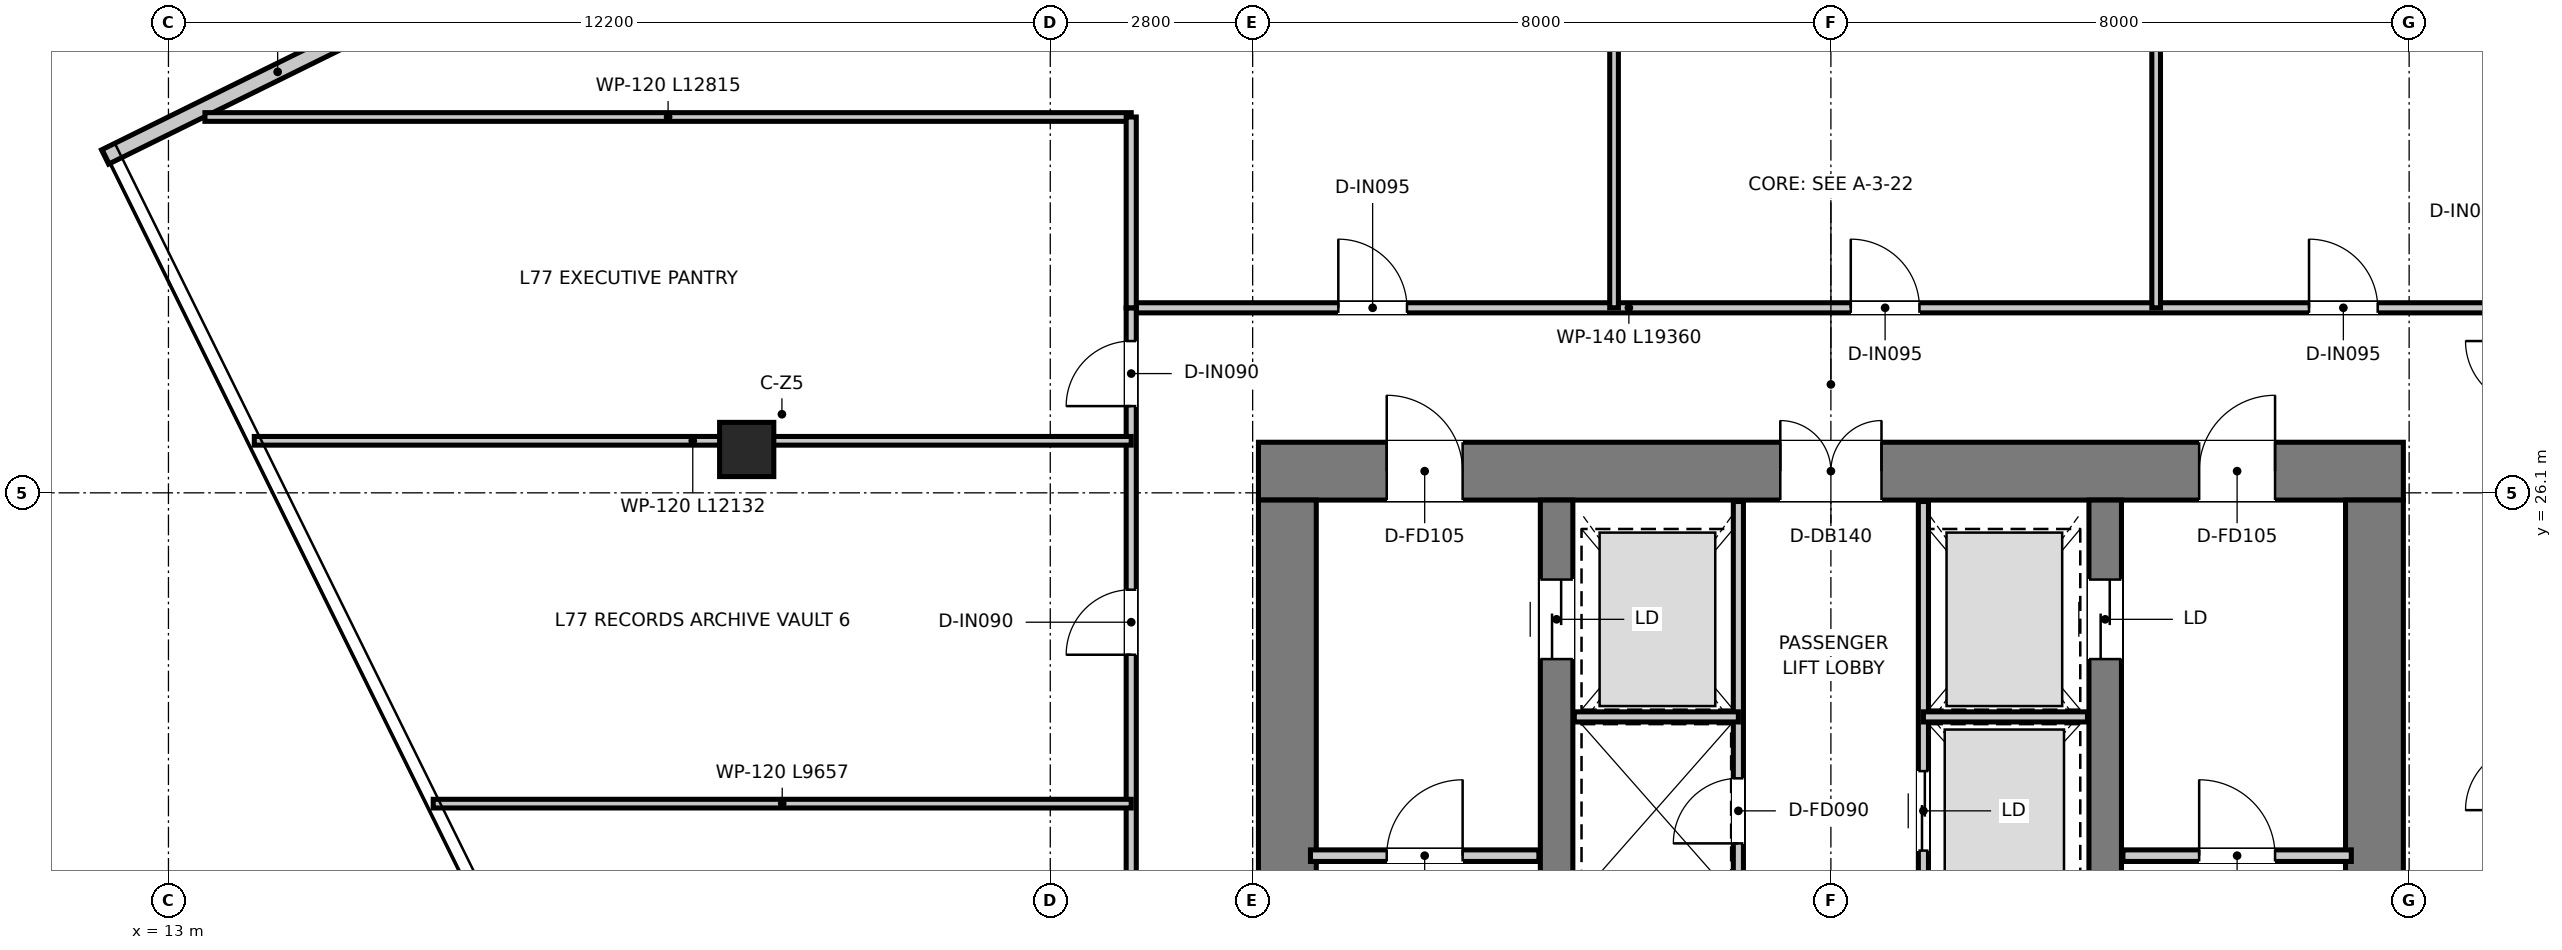
"""IFC4 building model, lengths in metres.
Left out: names, types, materials, properties, quantities, classifications, styles, units other than length and angle.
Written with IfcOpenShell. Run it as: python <this file> out.ifc"""

import sys

from ifc_helpers import new_model, si_unit, direction, frame, frame_2d, origin, origin_2d, place, context, subcontext, project, spatial, rectangle, extrude, source, transform, mapped, element, fill, save


model = new_model("IFC4")
c1 = context("Model", 3, precision=1e-05, world=origin(), true_north=direction((0.0, 1.0)))
c2 = subcontext(c1, "Body", "Model", "MODEL_VIEW")
j1 = project(units=[si_unit("LENGTHUNIT", "METRE"), si_unit("PLANEANGLEUNIT", "RADIAN")], contexts=[c1])
p1 = place(None, origin())
s1 = spatial("IfcSite", under=j1, at=p1, CompositionType="ELEMENT")
p2 = place(p1, origin())
s2 = spatial("IfcBuilding", under=s1, at=p2, CompositionType="ELEMENT")
p3 = place(p2, frame((0.0, 0.0, 314.8)))
s3 = spatial("IfcBuildingStorey", under=s2, at=p3, CompositionType="ELEMENT", Elevation=314.8)
p4 = place(p3, frame((28.08, 26.4, 0.0), z_axis=(0.0, 0.0, 1.0), x_axis=(1.0, 0.0, 0.0)))
e1 = element("IfcWall", 1, at=p4, inside=s3, PredefinedType="SHEAR", context=c2, shape_type="SweptSolid", body=[
    extrude(rectangle(XDim=15.84, YDim=0.8, at=frame_2d((7.92, 0.0))), origin(), (0.0, 0.0, 1.0), 3.95),
])
p5 = place(p4, frame((7.22, 0.0, 0.0)))
e2 = element("IfcOpeningElement", 2, at=p5, cuts=e1, PredefinedType="OPENING", context=c2, shape_type="SweptSolid", body=[
    extrude(rectangle(XDim=1.4, YDim=2.2, at=frame_2d((0.7, 1.1))), frame((0.0, 0.41, 0.0), z_axis=(0.0, -1.0, 0.0), x_axis=(1.0, 0.0, 0.0)), (0.0, 0.0, 1.0), 0.82),
])
p6 = place(p4, frame((1.775, 0.0, 0.0)))
e3 = element("IfcOpeningElement", 3, at=p6, cuts=e1, PredefinedType="OPENING", context=c2, shape_type="SweptSolid", body=[
    extrude(rectangle(XDim=1.05, YDim=2.1, at=frame_2d((0.525, 1.05))), frame((0.0, 0.41, 0.0), z_axis=(0.0, -1.0, 0.0), x_axis=(1.0, 0.0, 0.0)), (0.0, 0.0, 1.0), 0.82),
])
p7 = place(p4, frame((13.015, 0.0, 0.0)))
e4 = element("IfcOpeningElement", 4, at=p7, cuts=e1, PredefinedType="OPENING", context=c2, shape_type="SweptSolid", body=[
    extrude(rectangle(XDim=1.05, YDim=2.1, at=frame_2d((0.525, 1.05))), frame((0.0, 0.41, 0.0), z_axis=(0.0, -1.0, 0.0), x_axis=(1.0, 0.0, 0.0)), (0.0, 0.0, 1.0), 0.82),
])
for number, where, z_axis, x_axis in (
    (5, (28.48, 11.3, 0.0), (0.0, 0.0, 1.0), (0.0, 1.0, 0.0)),
    (6, (43.52, 11.3, 0.0), (0.0, 0.0, 1.0), (0.0, 1.0, 0.0)),
):
    element("IfcWall", number, at=place(p3, frame(where, z_axis=z_axis, x_axis=x_axis)), inside=s3, PredefinedType="SHEAR", context=c2, shape_type="SweptSolid", body=[
        extrude(rectangle(XDim=14.7, YDim=0.8, at=frame_2d((7.35, 0.0))), origin(), (0.0, 0.0, 1.0), 3.95),
    ])
p8 = place(p3, frame((32.205, 13.22, 0.0), z_axis=(0.0, 0.0, 1.0), x_axis=(0.0, 1.0, 0.0)))
e7 = element("IfcWall", 7, at=p8, inside=s3, PredefinedType="SHEAR", context=c2, shape_type="SweptSolid", body=[
    extrude(rectangle(XDim=12.78, YDim=0.45, at=frame_2d((6.39, 0.0))), origin(), (0.0, 0.0, 1.0), 3.95),
])
p9 = place(p8, frame((10.58, 0.0, 0.0)))
e8 = element("IfcOpeningElement", 8, at=p9, cuts=e7, PredefinedType="OPENING", context=c2, shape_type="SweptSolid", body=[
    extrude(rectangle(XDim=1.1, YDim=2.15, at=frame_2d((0.55, 1.075))), frame((0.0, 0.235, 0.0), z_axis=(0.0, -1.0, 0.0), x_axis=(1.0, 0.0, 0.0)), (0.0, 0.0, 1.0), 0.47),
])
p10 = place(p3, frame((39.795, 13.22, 0.0), z_axis=(0.0, 0.0, 1.0), x_axis=(0.0, 1.0, 0.0)))
e9 = element("IfcWall", 9, at=p10, inside=s3, PredefinedType="SHEAR", context=c2, shape_type="SweptSolid", body=[
    extrude(rectangle(XDim=12.78, YDim=0.45, at=frame_2d((6.39, 0.0))), origin(), (0.0, 0.0, 1.0), 3.95),
])
p11 = place(p10, frame((10.58, 0.0, 0.0)))
e10 = element("IfcOpeningElement", 10, at=p11, cuts=e9, PredefinedType="OPENING", context=c2, shape_type="SweptSolid", body=[
    extrude(rectangle(XDim=1.1, YDim=2.15, at=frame_2d((0.55, 1.075))), frame((0.0, 0.235, 0.0), z_axis=(0.0, -1.0, 0.0), x_axis=(1.0, 0.0, 0.0)), (0.0, 0.0, 1.0), 0.47),
])
m1 = source(origin(), c2, "Body", "SweptSolid", [
    extrude(rectangle(XDim=0.75, YDim=0.75, at=origin_2d()), origin(), (0.0, 0.0, 1.0), 3.95),
])
p12 = place(p3, frame((21.0, 26.7, 0.0), z_axis=(0.0, 0.0, 1.0), x_axis=(1.0, 0.0, 0.0)))
e11 = element("IfcColumn", 11, at=p12, inside=s3, PredefinedType="COLUMN", context=c2, shape_type="MappedRepresentation", body=[
    mapped(m1, transform((0.0, 0.0, 0.0), x_axis=(1.0, 0.0, 0.0), y_axis=(0.0, 1.0, 0.0), z_axis=(0.0, 0.0, 1.0), scale=1.0)),
])
p13 = place(p3, frame((16.899, 33.102, 0.0), z_axis=(0.0, 0.0, 1.0), x_axis=(-0.896889306105, -0.442255099003, 0.0)))
e12 = element("IfcWall", 12, at=p13, inside=s3, PredefinedType="ELEMENTEDWALL", context=c2, shape_type="SweptSolid", body=[
    extrude(rectangle(XDim=5.325, YDim=0.22, at=frame_2d((2.663, 0.0))), origin(), (0.0, 0.0, 1.0), 3.59),
])
p14 = place(p3, frame((28.8, 21.08, 0.0), z_axis=(0.0, 0.0, 1.0), x_axis=(1.0, 0.0, 0.0)))
e13 = element("IfcWall", 13, at=p14, inside=s3, PredefinedType="PARTITIONING", context=c2, shape_type="SweptSolid", body=[
    extrude(rectangle(XDim=3.16, YDim=0.16, at=frame_2d((1.58, 0.0))), origin(), (0.0, 0.0, 1.0), 3.59),
])
p15 = place(p14, frame((1.055, 0.0, 0.0)))
e14 = element("IfcOpeningElement", 14, at=p15, cuts=e13, PredefinedType="OPENING", context=c2, shape_type="SweptSolid", body=[
    extrude(rectangle(XDim=1.05, YDim=2.1, at=frame_2d((0.525, 1.05))), frame((0.0, 0.09, 0.0), z_axis=(0.0, -1.0, 0.0), x_axis=(1.0, 0.0, 0.0)), (0.0, 0.0, 1.0), 0.18),
])
p16 = place(p3, frame((40.04, 21.08, 0.0), z_axis=(0.0, 0.0, 1.0), x_axis=(1.0, 0.0, 0.0)))
e15 = element("IfcWall", 15, at=p16, inside=s3, PredefinedType="PARTITIONING", context=c2, shape_type="SweptSolid", body=[
    extrude(rectangle(XDim=3.16, YDim=0.16, at=frame_2d((1.58, 0.0))), origin(), (0.0, 0.0, 1.0), 3.59),
])
p17 = place(p16, frame((1.055, 0.0, 0.0)))
e16 = element("IfcOpeningElement", 16, at=p17, cuts=e15, PredefinedType="OPENING", context=c2, shape_type="SweptSolid", body=[
    extrude(rectangle(XDim=1.05, YDim=2.1, at=frame_2d((0.525, 1.05))), frame((0.0, 0.09, 0.0), z_axis=(0.0, -1.0, 0.0), x_axis=(1.0, 0.0, 0.0)), (0.0, 0.0, 1.0), 0.18),
])
p18 = place(p3, frame((34.72, 20.2, 0.0), z_axis=(0.0, 0.0, 1.0), x_axis=(0.0, 1.0, 0.0)))
e17 = element("IfcWall", 17, at=p18, inside=s3, PredefinedType="PARTITIONING", context=c2, shape_type="SweptSolid", body=[
    extrude(rectangle(XDim=5.78, YDim=0.14, at=frame_2d((2.89, 0.0))), origin(), (0.0, 0.0, 1.0), 2.74),
])
p19 = place(p18, frame((1.05, 0.0, 0.0)))
e18 = element("IfcOpeningElement", 18, at=p19, cuts=e17, PredefinedType="OPENING", context=c2, shape_type="SweptSolid", body=[
    extrude(rectangle(XDim=0.9, YDim=2.1, at=frame_2d((0.45, 1.05))), frame((0.0, 0.08, 0.0), z_axis=(0.0, -1.0, 0.0), x_axis=(1.0, 0.0, 0.0)), (0.0, 0.0, 1.0), 0.16),
])
p20 = place(p3, frame((37.28, 20.2, 0.0), z_axis=(0.0, 0.0, 1.0), x_axis=(0.0, 1.0, 0.0)))
e19 = element("IfcWall", 19, at=p20, inside=s3, PredefinedType="PARTITIONING", context=c2, shape_type="SweptSolid", body=[
    extrude(rectangle(XDim=5.78, YDim=0.14, at=frame_2d((2.89, 0.0))), origin(), (0.0, 0.0, 1.0), 2.74),
])
p21 = place(p20, frame((0.95, 0.0, 0.0)))
e20 = element("IfcOpeningElement", 20, at=p21, cuts=e19, PredefinedType="OPENING", context=c2, shape_type="SweptSolid", body=[
    extrude(rectangle(XDim=1.1, YDim=2.15, at=frame_2d((0.55, 1.075))), frame((0.0, 0.08, 0.0), z_axis=(0.0, -1.0, 0.0), x_axis=(1.0, 0.0, 0.0)), (0.0, 0.0, 1.0), 0.16),
])
for number, where, z_axis, x_axis in (
    (21, (32.45, 23.0, 0.0), (0.0, 0.0, 1.0), (1.0, 0.0, 0.0)),
    (22, (37.28, 23.0, 0.0), (0.0, 0.0, 1.0), (1.0, 0.0, 0.0)),
):
    element("IfcWall", number, at=place(p3, frame(where, z_axis=z_axis, x_axis=x_axis)), inside=s3, PredefinedType="PARTITIONING", context=c2, shape_type="SweptSolid", body=[
        extrude(rectangle(XDim=2.27, YDim=0.14, at=frame_2d((1.135, 0.0))), origin(), (0.0, 0.0, 1.0), 2.74),
    ])
p22 = place(p3, frame((26.32, 28.66, 0.0), z_axis=(0.0, 0.0, 1.0), x_axis=(1.0, 0.0, 0.0)))
e23 = element("IfcWall", 23, at=p22, inside=s3, PredefinedType="PARTITIONING", context=c2, shape_type="SweptSolid", body=[
    extrude(rectangle(XDim=19.36, YDim=0.14, at=frame_2d((9.68, 0.0))), origin(), (0.0, 0.0, 1.0), 3.1),
])
p23 = place(p22, frame((2.865, 0.0, 0.0)))
e24 = element("IfcOpeningElement", 24, at=p23, cuts=e23, PredefinedType="OPENING", context=c2, shape_type="SweptSolid", body=[
    extrude(rectangle(XDim=0.95, YDim=2.1, at=frame_2d((0.475, 1.05))), frame((0.0, 0.08, 0.0), z_axis=(0.0, -1.0, 0.0), x_axis=(1.0, 0.0, 0.0)), (0.0, 0.0, 1.0), 0.16),
])
p24 = place(p22, frame((9.955, 0.0, 0.0)))
e25 = element("IfcOpeningElement", 25, at=p24, cuts=e23, PredefinedType="OPENING", context=c2, shape_type="SweptSolid", body=[
    extrude(rectangle(XDim=0.95, YDim=2.1, at=frame_2d((0.475, 1.05))), frame((0.0, 0.08, 0.0), z_axis=(0.0, -1.0, 0.0), x_axis=(1.0, 0.0, 0.0)), (0.0, 0.0, 1.0), 0.16),
])
p25 = place(p22, frame((16.295, 0.0, 0.0)))
e26 = element("IfcOpeningElement", 26, at=p25, cuts=e23, PredefinedType="OPENING", context=c2, shape_type="SweptSolid", body=[
    extrude(rectangle(XDim=0.95, YDim=2.1, at=frame_2d((0.475, 1.05))), frame((0.0, 0.08, 0.0), z_axis=(0.0, -1.0, 0.0), x_axis=(1.0, 0.0, 0.0)), (0.0, 0.0, 1.0), 0.16),
])
p26 = place(p3, frame((26.32, 9.0, 0.0), z_axis=(0.0, 0.0, 1.0), x_axis=(0.0, 1.0, 0.0)))
e27 = element("IfcWall", 27, at=p26, inside=s3, PredefinedType="PARTITIONING", context=c2, shape_type="SweptSolid", body=[
    extrude(rectangle(XDim=19.66, YDim=0.14, at=frame_2d((9.83, 0.0))), origin(), (0.0, 0.0, 1.0), 3.05),
])
p27 = place(p26, frame((18.3, 0.0, 0.0)))
e28 = element("IfcOpeningElement", 28, at=p27, cuts=e27, PredefinedType="OPENING", context=c2, shape_type="SweptSolid", body=[
    extrude(rectangle(XDim=0.9, YDim=2.1, at=frame_2d((0.45, 1.05))), frame((0.0, 0.08, 0.0), z_axis=(0.0, -1.0, 0.0), x_axis=(1.0, 0.0, 0.0)), (0.0, 0.0, 1.0), 0.16),
])
p28 = place(p26, frame((1.95, 0.0, 0.0)))
e29 = element("IfcOpeningElement", 29, at=p28, cuts=e27, PredefinedType="OPENING", context=c2, shape_type="SweptSolid", body=[
    extrude(rectangle(XDim=0.9, YDim=2.1, at=frame_2d((0.45, 1.05))), frame((0.0, 0.08, 0.0), z_axis=(0.0, -1.0, 0.0), x_axis=(1.0, 0.0, 0.0)), (0.0, 0.0, 1.0), 0.16),
])
p29 = place(p26, frame((10.2, 0.0, 0.0)))
e30 = element("IfcOpeningElement", 30, at=p29, cuts=e27, PredefinedType="OPENING", context=c2, shape_type="SweptSolid", body=[
    extrude(rectangle(XDim=0.9, YDim=2.1, at=frame_2d((0.45, 1.05))), frame((0.0, 0.08, 0.0), z_axis=(0.0, -1.0, 0.0), x_axis=(1.0, 0.0, 0.0)), (0.0, 0.0, 1.0), 0.16),
])
p30 = place(p26, frame((14.86, 0.0, 0.0)))
e31 = element("IfcOpeningElement", 31, at=p30, cuts=e27, PredefinedType="OPENING", context=c2, shape_type="SweptSolid", body=[
    extrude(rectangle(XDim=0.9, YDim=2.1, at=frame_2d((0.45, 1.05))), frame((0.0, 0.08, 0.0), z_axis=(0.0, -1.0, 0.0), x_axis=(1.0, 0.0, 0.0)), (0.0, 0.0, 1.0), 0.16),
])
p31 = place(p3, frame((14.188, 26.82, 0.0), z_axis=(0.0, 0.0, 1.0), x_axis=(1.0, 0.0, 0.0)))
e32 = element("IfcWall", 32, at=p31, inside=s3, PredefinedType="PARTITIONING", context=c2, shape_type="SweptSolid", body=[
    extrude(rectangle(XDim=12.133, YDim=0.12, at=frame_2d((6.066, 0.0))), origin(), (0.0, 0.0, 1.0), 3.05),
])
p32 = place(p3, frame((13.505, 31.3, 0.0), z_axis=(0.0, 0.0, 1.0), x_axis=(1.0, 0.0, 0.0)))
e33 = element("IfcWall", 33, at=p32, inside=s3, PredefinedType="PARTITIONING", context=c2, shape_type="SweptSolid", body=[
    extrude(rectangle(XDim=12.815, YDim=0.12, at=frame_2d((6.408, 0.0))), origin(), (0.0, 0.0, 1.0), 3.05),
])
p33 = place(p3, frame((26.32, 28.66, 0.0), z_axis=(0.0, 0.0, 1.0), x_axis=(0.0, 1.0, 0.0)))
e34 = element("IfcWall", 34, at=p33, inside=s3, PredefinedType="PARTITIONING", context=c2, shape_type="SweptSolid", body=[
    extrude(rectangle(XDim=2.64, YDim=0.14, at=frame_2d((1.32, 0.0))), origin(), (0.0, 0.0, 1.0), 3.35),
])
p34 = place(p3, frame((33.0, 28.66, 0.0), z_axis=(0.0, 0.0, 1.0), x_axis=(0.0, 1.0, 0.0)))
e35 = element("IfcWall", 35, at=p34, inside=s3, PredefinedType="PARTITIONING", context=c2, shape_type="SweptSolid", body=[
    extrude(rectangle(XDim=18.314, YDim=0.12, at=frame_2d((9.157, 0.0))), origin(), (0.0, 0.0, 1.0), 3.05),
])
p35 = place(p3, frame((40.5, 28.66, 0.0), z_axis=(0.0, 0.0, 1.0), x_axis=(0.0, 1.0, 0.0)))
e36 = element("IfcWall", 36, at=p35, inside=s3, PredefinedType="PARTITIONING", context=c2, shape_type="SweptSolid", body=[
    extrude(rectangle(XDim=20.738, YDim=0.12, at=frame_2d((10.369, 0.0))), origin(), (0.0, 0.0, 1.0), 3.05),
])
p36 = place(p3, frame((16.663, 21.8, 0.0), z_axis=(0.0, 0.0, 1.0), x_axis=(1.0, 0.0, 0.0)))
e37 = element("IfcWall", 37, at=p36, inside=s3, PredefinedType="PARTITIONING", context=c2, shape_type="SweptSolid", body=[
    extrude(rectangle(XDim=9.657, YDim=0.12, at=frame_2d((4.829, 0.0))), origin(), (0.0, 0.0, 1.0), 3.05),
])
p37 = place(p15, origin())
e38 = element("IfcDoor", 38, at=p37, inside=s3, OperationType="SINGLE_SWING_RIGHT", PredefinedType="DOOR", context=c2, shape_type="SweptSolid", body=[
    extrude(rectangle(XDim=1.05, YDim=2.1, at=frame_2d((0.525, 1.05))), frame((0.0, 0.025, 0.0), z_axis=(0.0, -1.0, 0.0), x_axis=(1.0, 0.0, 0.0)), (0.0, 0.0, 1.0), 0.05),
])
fill(e14, e38)
p38 = place(p17, origin())
e39 = element("IfcDoor", 39, at=p38, inside=s3, OperationType="SINGLE_SWING_LEFT", PredefinedType="DOOR", context=c2, shape_type="SweptSolid", body=[
    extrude(rectangle(XDim=1.05, YDim=2.1, at=frame_2d((0.525, 1.05))), frame((0.0, 0.025, 0.0), z_axis=(0.0, -1.0, 0.0), x_axis=(1.0, 0.0, 0.0)), (0.0, 0.0, 1.0), 0.05),
])
fill(e16, e39)
p39 = place(p5, origin())
e40 = element("IfcDoor", 40, at=p39, inside=s3, OperationType="DOUBLE_DOOR_SINGLE_SWING", PredefinedType="DOOR", context=c2, shape_type="SweptSolid", body=[
    extrude(rectangle(XDim=1.4, YDim=2.2, at=frame_2d((0.7, 1.1))), frame((0.0, 0.025, 0.0), z_axis=(0.0, -1.0, 0.0), x_axis=(1.0, 0.0, 0.0)), (0.0, 0.0, 1.0), 0.05),
])
fill(e2, e40)
p40 = place(p6, origin())
e41 = element("IfcDoor", 41, at=p40, inside=s3, OperationType="SINGLE_SWING_LEFT", PredefinedType="DOOR", context=c2, shape_type="SweptSolid", body=[
    extrude(rectangle(XDim=1.05, YDim=2.1, at=frame_2d((0.525, 1.05))), frame((0.0, 0.025, 0.0), z_axis=(0.0, -1.0, 0.0), x_axis=(1.0, 0.0, 0.0)), (0.0, 0.0, 1.0), 0.05),
])
fill(e3, e41)
p41 = place(p7, origin())
e42 = element("IfcDoor", 42, at=p41, inside=s3, OperationType="SINGLE_SWING_RIGHT", PredefinedType="DOOR", context=c2, shape_type="SweptSolid", body=[
    extrude(rectangle(XDim=1.05, YDim=2.1, at=frame_2d((0.525, 1.05))), frame((0.0, 0.025, 0.0), z_axis=(0.0, -1.0, 0.0), x_axis=(1.0, 0.0, 0.0)), (0.0, 0.0, 1.0), 0.05),
])
fill(e4, e42)
p42 = place(p9, origin())
e43 = element("IfcDoor", 43, at=p42, inside=s3, OperationType="DOUBLE_DOOR_SLIDING", PredefinedType="DOOR", context=c2, shape_type="SweptSolid", body=[
    extrude(rectangle(XDim=1.1, YDim=2.15, at=frame_2d((0.55, 1.075))), frame((0.0, 0.025, 0.0), z_axis=(0.0, -1.0, 0.0), x_axis=(1.0, 0.0, 0.0)), (0.0, 0.0, 1.0), 0.05),
])
fill(e8, e43)
p43 = place(p11, origin())
e44 = element("IfcDoor", 44, at=p43, inside=s3, OperationType="DOUBLE_DOOR_SLIDING", PredefinedType="DOOR", context=c2, shape_type="SweptSolid", body=[
    extrude(rectangle(XDim=1.1, YDim=2.15, at=frame_2d((0.55, 1.075))), frame((0.0, 0.025, 0.0), z_axis=(0.0, -1.0, 0.0), x_axis=(1.0, 0.0, 0.0)), (0.0, 0.0, 1.0), 0.05),
])
fill(e10, e44)
p44 = place(p19, origin())
e45 = element("IfcDoor", 45, at=p44, inside=s3, OperationType="SINGLE_SWING_LEFT", PredefinedType="DOOR", context=c2, shape_type="SweptSolid", body=[
    extrude(rectangle(XDim=0.9, YDim=2.1, at=frame_2d((0.45, 1.05))), frame((0.0, 0.025, 0.0), z_axis=(0.0, -1.0, 0.0), x_axis=(1.0, 0.0, 0.0)), (0.0, 0.0, 1.0), 0.05),
])
fill(e18, e45)
p45 = place(p21, origin())
e46 = element("IfcDoor", 46, at=p45, inside=s3, OperationType="DOUBLE_DOOR_SLIDING", PredefinedType="DOOR", context=c2, shape_type="SweptSolid", body=[
    extrude(rectangle(XDim=1.1, YDim=2.15, at=frame_2d((0.55, 1.075))), frame((0.0, 0.025, 0.0), z_axis=(0.0, -1.0, 0.0), x_axis=(1.0, 0.0, 0.0)), (0.0, 0.0, 1.0), 0.05),
])
fill(e20, e46)
p46 = place(p27, origin())
e47 = element("IfcDoor", 47, at=p46, inside=s3, OperationType="SINGLE_SWING_LEFT", PredefinedType="DOOR", context=c2, shape_type="SweptSolid", body=[
    extrude(rectangle(XDim=0.9, YDim=2.1, at=frame_2d((0.45, 1.05))), frame((0.0, 0.025, 0.0), z_axis=(0.0, -1.0, 0.0), x_axis=(1.0, 0.0, 0.0)), (0.0, 0.0, 1.0), 0.05),
])
fill(e28, e47)
p47 = place(p23, origin())
e48 = element("IfcDoor", 48, at=p47, inside=s3, OperationType="SINGLE_SWING_LEFT", PredefinedType="DOOR", context=c2, shape_type="SweptSolid", body=[
    extrude(rectangle(XDim=0.95, YDim=2.1, at=frame_2d((0.475, 1.05))), frame((0.0, 0.025, 0.0), z_axis=(0.0, -1.0, 0.0), x_axis=(1.0, 0.0, 0.0)), (0.0, 0.0, 1.0), 0.05),
])
fill(e24, e48)
p48 = place(p24, origin())
e49 = element("IfcDoor", 49, at=p48, inside=s3, OperationType="SINGLE_SWING_LEFT", PredefinedType="DOOR", context=c2, shape_type="SweptSolid", body=[
    extrude(rectangle(XDim=0.95, YDim=2.1, at=frame_2d((0.475, 1.05))), frame((0.0, 0.025, 0.0), z_axis=(0.0, -1.0, 0.0), x_axis=(1.0, 0.0, 0.0)), (0.0, 0.0, 1.0), 0.05),
])
fill(e25, e49)
p49 = place(p25, origin())
e50 = element("IfcDoor", 50, at=p49, inside=s3, OperationType="SINGLE_SWING_LEFT", PredefinedType="DOOR", context=c2, shape_type="SweptSolid", body=[
    extrude(rectangle(XDim=0.95, YDim=2.1, at=frame_2d((0.475, 1.05))), frame((0.0, 0.025, 0.0), z_axis=(0.0, -1.0, 0.0), x_axis=(1.0, 0.0, 0.0)), (0.0, 0.0, 1.0), 0.05),
])
fill(e26, e50)
p50 = place(p30, origin())
e51 = element("IfcDoor", 51, at=p50, inside=s3, OperationType="SINGLE_SWING_LEFT", PredefinedType="DOOR", context=c2, shape_type="SweptSolid", body=[
    extrude(rectangle(XDim=0.9, YDim=2.1, at=frame_2d((0.45, 1.05))), frame((0.0, 0.025, 0.0), z_axis=(0.0, -1.0, 0.0), x_axis=(1.0, 0.0, 0.0)), (0.0, 0.0, 1.0), 0.05),
])
fill(e31, e51)
save(model, sys.argv[1])
